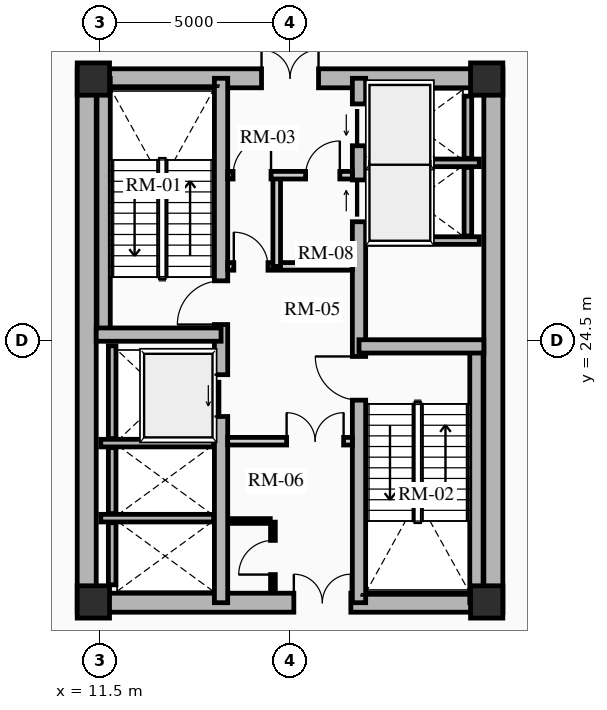
"""IFC4 building model, lengths in metres.
Left out: names, types, materials, properties, quantities, classifications, styles, units other than length and angle.
Written with IfcOpenShell. Run it as: python <this file> out.ifc"""

import sys

from ifc_helpers import new_model, si_unit, direction, frame, frame_2d, origin, origin_2d, place, context, subcontext, project, spatial, rectangle, extrude, source, transform, mapped, element, fill, save


model = new_model("IFC4")
c1 = context("Model", 3, precision=1e-05, world=origin(), true_north=direction((0.0, 1.0)))
c2 = subcontext(c1, "Body", "Model", "MODEL_VIEW")
j1 = project(units=[si_unit("LENGTHUNIT", "METRE"), si_unit("PLANEANGLEUNIT", "RADIAN")], contexts=[c1])
p1 = place(None, origin())
s1 = spatial("IfcSite", under=j1, at=p1, CompositionType="ELEMENT")
p2 = place(p1, origin())
s2 = spatial("IfcBuilding", under=s1, at=p2, CompositionType="ELEMENT")
p3 = place(p2, frame((0.0, 0.0, 9.0)))
s3 = spatial("IfcBuildingStorey", under=s2, at=p3, CompositionType="ELEMENT", Elevation=9.0)
for number, where, z_axis, x_axis in (
    (1, (11.15, 17.35, 0.0), (0.0, 0.0, 1.0), (0.0, 1.0, 0.0)),
    (2, (21.85, 17.35, 0.0), (0.0, 0.0, 1.0), (0.0, 1.0, 0.0)),
):
    element("IfcWall", number, at=place(p3, frame(where, z_axis=z_axis, x_axis=x_axis)), inside=s3, PredefinedType="SHEAR", context=c2, shape_type="SweptSolid", body=[
        extrude(rectangle(XDim=14.3, YDim=0.5, at=frame_2d((7.15, 0.0))), origin(), (0.0, 0.0, 1.0), 4.2),
    ])
p4 = place(p3, frame((11.15, 17.6, 0.0), z_axis=(0.0, 0.0, 1.0), x_axis=(1.0, 0.0, 0.0)))
e3 = element("IfcWall", 3, at=p4, inside=s3, PredefinedType="SHEAR", context=c2, shape_type="SweptSolid", body=[
    extrude(rectangle(XDim=10.7, YDim=0.5, at=frame_2d((5.35, 0.0))), origin(), (0.0, 0.0, 1.0), 4.2),
])
m1 = source(origin(), c2, "Body", "SweptSolid", [
    extrude(rectangle(XDim=1.5, YDim=2.02, at=frame_2d((0.75, 1.01))), frame((0.0, 0.26, 0.0), z_axis=(0.0, -1.0, 0.0), x_axis=(1.0, 0.0, 0.0)), (0.0, 0.0, 1.0), 0.52),
])
p5 = place(p4, frame((5.45, 0.0, 0.0)))
e4 = element("IfcOpeningElement", 4, at=p5, cuts=e3, PredefinedType="OPENING", context=c2, shape_type="MappedRepresentation", body=[
    mapped(m1, transform((0.0, 0.0, 0.0), x_axis=(1.0, 0.0, 0.0), y_axis=(0.0, 1.0, 0.0), z_axis=(0.0, 0.0, 1.0), scale=1.0)),
])
p6 = place(p3, frame((11.15, 31.4, 0.0), z_axis=(0.0, 0.0, 1.0), x_axis=(1.0, 0.0, 0.0)))
e5 = element("IfcWall", 5, at=p6, inside=s3, PredefinedType="SHEAR", context=c2, shape_type="SweptSolid", body=[
    extrude(rectangle(XDim=10.7, YDim=0.5, at=frame_2d((5.35, 0.0))), origin(), (0.0, 0.0, 1.0), 4.2),
])
p7 = place(p6, frame((4.6, 0.0, 0.0)))
e6 = element("IfcOpeningElement", 6, at=p7, cuts=e5, PredefinedType="OPENING", context=c2, shape_type="MappedRepresentation", body=[
    mapped(m1, transform((0.0, 0.0, 0.0), x_axis=(1.0, 0.0, 0.0), y_axis=(0.0, 1.0, 0.0), z_axis=(0.0, 0.0, 1.0), scale=1.0)),
])
p8 = place(p3, frame((14.685, 17.6, 0.0), z_axis=(0.0, 0.0, 1.0), x_axis=(0.0, 1.0, 0.0)))
e7 = element("IfcWall", 7, at=p8, inside=s3, PredefinedType="SHEAR", context=c2, shape_type="SweptSolid", body=[
    extrude(rectangle(XDim=13.8, YDim=0.35, at=frame_2d((6.9, 0.0))), origin(), (0.0, 0.0, 1.0), 4.2),
])
m2 = source(origin(), c2, "Body", "SweptSolid", [
    extrude(rectangle(XDim=1.1, YDim=2.015, at=frame_2d((0.55, 1.007))), frame((0.0, 0.185, 0.0), z_axis=(0.0, -1.0, 0.0), x_axis=(1.0, 0.0, 0.0)), (0.0, 0.0, 1.0), 0.37),
])
p9 = place(p8, frame((4.9, 0.0, 0.0)))
e8 = element("IfcOpeningElement", 8, at=p9, cuts=e7, PredefinedType="OPENING", context=c2, shape_type="MappedRepresentation", body=[
    mapped(m2, transform((0.0, 0.0, 0.0), x_axis=(1.0, 0.0, 0.0), y_axis=(0.0, 1.0, 0.0), z_axis=(0.0, 0.0, 1.0), scale=1.0)),
])
m3 = source(origin(), c2, "Body", "SweptSolid", [
    extrude(rectangle(XDim=1.15, YDim=2.02, at=frame_2d((0.575, 1.01))), frame((0.0, 0.185, 0.0), z_axis=(0.0, -1.0, 0.0), x_axis=(1.0, 0.0, 0.0)), (0.0, 0.0, 1.0), 0.37),
])
p10 = place(p8, frame((7.32, 0.0, 0.0)))
e9 = element("IfcOpeningElement", 9, at=p10, cuts=e7, PredefinedType="OPENING", context=c2, shape_type="MappedRepresentation", body=[
    mapped(m3, transform((0.0, 0.0, 0.0), x_axis=(1.0, 0.0, 0.0), y_axis=(0.0, 1.0, 0.0), z_axis=(0.0, 0.0, 1.0), scale=1.0)),
])
p11 = place(p3, frame((18.315, 17.6, 0.0), z_axis=(0.0, 0.0, 1.0), x_axis=(0.0, 1.0, 0.0)))
e10 = element("IfcWall", 10, at=p11, inside=s3, PredefinedType="SHEAR", context=c2, shape_type="SweptSolid", body=[
    extrude(rectangle(XDim=13.8, YDim=0.35, at=frame_2d((6.9, 0.0))), origin(), (0.0, 0.0, 1.0), 4.2),
])
p12 = place(p11, frame((10.025, 0.0, 0.0)))
e11 = element("IfcOpeningElement", 11, at=p12, cuts=e10, PredefinedType="OPENING", context=c2, shape_type="MappedRepresentation", body=[
    mapped(m2, transform((0.0, 0.0, 0.0), x_axis=(1.0, 0.0, 0.0), y_axis=(0.0, 1.0, 0.0), z_axis=(0.0, 0.0, 1.0), scale=1.0)),
])
p13 = place(p11, frame((12.025, 0.0, 0.0)))
e12 = element("IfcOpeningElement", 12, at=p13, cuts=e10, PredefinedType="OPENING", context=c2, shape_type="MappedRepresentation", body=[
    mapped(m2, transform((0.0, 0.0, 0.0), x_axis=(1.0, 0.0, 0.0), y_axis=(0.0, 1.0, 0.0), z_axis=(0.0, 0.0, 1.0), scale=1.0)),
])
p14 = place(p11, frame((5.33, 0.0, 0.0)))
e13 = element("IfcOpeningElement", 13, at=p14, cuts=e10, PredefinedType="OPENING", context=c2, shape_type="MappedRepresentation", body=[
    mapped(m3, transform((0.0, 0.0, 0.0), x_axis=(1.0, 0.0, 0.0), y_axis=(0.0, 1.0, 0.0), z_axis=(0.0, 0.0, 1.0), scale=1.0)),
])
p15 = place(p3, frame((11.595, 24.655, 0.0), z_axis=(0.0, 0.0, 1.0), x_axis=(0.0, 1.0, 0.0)))
e14 = element("IfcWall", 14, at=p15, inside=s3, PredefinedType="SHEAR", context=c2, shape_type="SweptSolid", body=[
    extrude(rectangle(XDim=6.745, YDim=0.35, at=frame_2d((3.373, 0.0))), origin(), (0.0, 0.0, 1.0), 4.2),
])
p16 = place(p3, frame((11.4, 24.655, 0.0), z_axis=(0.0, 0.0, 1.0), x_axis=(1.0, 0.0, 0.0)))
e15 = element("IfcWall", 15, at=p16, inside=s3, PredefinedType="SHEAR", context=c2, shape_type="SweptSolid", body=[
    extrude(rectangle(XDim=3.285, YDim=0.35, at=frame_2d((1.643, 0.0))), origin(), (0.0, 0.0, 1.0), 4.2),
])
p17 = place(p3, frame((21.405, 17.6, 0.0), z_axis=(0.0, 0.0, 1.0), x_axis=(0.0, 1.0, 0.0)))
e16 = element("IfcWall", 16, at=p17, inside=s3, PredefinedType="SHEAR", context=c2, shape_type="SweptSolid", body=[
    extrude(rectangle(XDim=6.745, YDim=0.35, at=frame_2d((3.373, 0.0))), origin(), (0.0, 0.0, 1.0), 4.2),
])
p18 = place(p3, frame((18.315, 24.345, 0.0), z_axis=(0.0, 0.0, 1.0), x_axis=(1.0, 0.0, 0.0)))
e17 = element("IfcWall", 17, at=p18, inside=s3, PredefinedType="SHEAR", context=c2, shape_type="SweptSolid", body=[
    extrude(rectangle(XDim=3.285, YDim=0.35, at=frame_2d((1.643, 0.0))), origin(), (0.0, 0.0, 1.0), 4.2),
])
for number, where, z_axis, x_axis in (
    (18, (11.325, 17.62, 0.0), (0.0, 0.0, 1.0), (1.0, 0.0, 0.0)),
    (19, (11.325, 31.38, 0.0), (0.0, 0.0, 1.0), (1.0, 0.0, 0.0)),
    (20, (21.675, 17.62, 0.0), (0.0, 0.0, 1.0), (1.0, 0.0, 0.0)),
    (21, (21.675, 31.38, 0.0), (0.0, 0.0, 1.0), (1.0, 0.0, 0.0)),
):
    element("IfcColumn", number, at=place(p3, frame(where, z_axis=z_axis, x_axis=x_axis)), inside=s3, PredefinedType="COLUMN", context=c2, shape_type="SweptSolid", body=[
        extrude(rectangle(XDim=0.85, YDim=0.85, at=origin_2d()), origin(), (0.0, 0.0, 1.0), 4.2),
    ])
p19 = place(p3, frame((11.52, 21.8, 0.0), z_axis=(0.0, 0.0, 1.0), x_axis=(1.0, 0.0, 0.0)))
e22 = element("IfcWall", 22, at=p19, inside=s3, PredefinedType="SHEAR", context=c2, shape_type="SweptSolid", body=[
    extrude(rectangle(XDim=2.97, YDim=0.2, at=frame_2d((1.485, 0.0))), origin(), (0.0, 0.0, 1.0), 4.2),
])
p20 = place(p3, frame((11.82, 21.92, 0.0), z_axis=(0.0, 0.0, 1.0), x_axis=(0.0, 1.0, 0.0)))
e23 = element("IfcWall", 23, at=p20, inside=s3, PredefinedType="SHEAR", context=c2, shape_type="SweptSolid", body=[
    extrude(rectangle(XDim=2.44, YDim=0.2, at=frame_2d((1.22, 0.0))), origin(), (0.0, 0.0, 1.0), 4.2),
])
p21 = place(p3, frame((11.52, 19.825, 0.0), z_axis=(0.0, 0.0, 1.0), x_axis=(1.0, 0.0, 0.0)))
e24 = element("IfcWall", 24, at=p21, inside=s3, PredefinedType="SHEAR", context=c2, shape_type="SweptSolid", body=[
    extrude(rectangle(XDim=2.97, YDim=0.2, at=frame_2d((1.485, 0.0))), origin(), (0.0, 0.0, 1.0), 4.2),
])
p22 = place(p3, frame((11.82, 19.945, 0.0), z_axis=(0.0, 0.0, 1.0), x_axis=(0.0, 1.0, 0.0)))
e25 = element("IfcWall", 25, at=p22, inside=s3, PredefinedType="SHEAR", context=c2, shape_type="SweptSolid", body=[
    extrude(rectangle(XDim=1.735, YDim=0.2, at=frame_2d((0.867, 0.0))), origin(), (0.0, 0.0, 1.0), 4.2),
])
p23 = place(p3, frame((11.82, 18.07, 0.0), z_axis=(0.0, 0.0, 1.0), x_axis=(0.0, 1.0, 0.0)))
e26 = element("IfcWall", 26, at=p23, inside=s3, PredefinedType="SHEAR", context=c2, shape_type="SweptSolid", body=[
    extrude(rectangle(XDim=1.635, YDim=0.2, at=frame_2d((0.817, 0.0))), origin(), (0.0, 0.0, 1.0), 4.2),
])
for number, where, z_axis, x_axis in (
    (27, (18.51, 27.13, 0.0), (0.0, 0.0, 1.0), (1.0, 0.0, 0.0)),
    (28, (18.51, 29.175, 0.0), (0.0, 0.0, 1.0), (1.0, 0.0, 0.0)),
):
    element("IfcWall", number, at=place(p3, frame(where, z_axis=z_axis, x_axis=x_axis)), inside=s3, PredefinedType="SHEAR", context=c2, shape_type="SweptSolid", body=[
        extrude(rectangle(XDim=2.97, YDim=0.2, at=frame_2d((1.485, 0.0))), origin(), (0.0, 0.0, 1.0), 4.2),
    ])
p24 = place(p3, frame((21.18, 27.25, 0.0), z_axis=(0.0, 0.0, 1.0), x_axis=(0.0, 1.0, 0.0)))
e29 = element("IfcWall", 29, at=p24, inside=s3, PredefinedType="SHEAR", context=c2, shape_type="SweptSolid", body=[
    extrude(rectangle(XDim=1.805, YDim=0.2, at=frame_2d((0.902, 0.0))), origin(), (0.0, 0.0, 1.0), 4.2),
])
p25 = place(p3, frame((21.18, 29.295, 0.0), z_axis=(0.0, 0.0, 1.0), x_axis=(0.0, 1.0, 0.0)))
e30 = element("IfcWall", 30, at=p25, inside=s3, PredefinedType="SHEAR", context=c2, shape_type="SweptSolid", body=[
    extrude(rectangle(XDim=1.635, YDim=0.2, at=frame_2d((0.817, 0.0))), origin(), (0.0, 0.0, 1.0), 4.2),
])
p26 = place(p3, frame((14.86, 21.85, 0.0), z_axis=(0.0, 0.0, 1.0), x_axis=(1.0, 0.0, 0.0)))
e31 = element("IfcWall", 31, at=p26, inside=s3, PredefinedType="PARTITIONING", context=c2, shape_type="SweptSolid", body=[
    extrude(rectangle(XDim=3.28, YDim=0.2, at=frame_2d((1.64, 0.0))), origin(), (0.0, 0.0, 1.0), 3.885),
])
m4 = source(origin(), c2, "Body", "SweptSolid", [
    extrude(rectangle(XDim=1.5, YDim=2.02, at=frame_2d((0.75, 1.01))), frame((0.0, 0.11, 0.0), z_axis=(0.0, -1.0, 0.0), x_axis=(1.0, 0.0, 0.0)), (0.0, 0.0, 1.0), 0.22),
])
p27 = place(p26, frame((1.55, 0.0, 0.0)))
e32 = element("IfcOpeningElement", 32, at=p27, cuts=e31, PredefinedType="OPENING", context=c2, shape_type="MappedRepresentation", body=[
    mapped(m4, transform((0.0, 0.0, 0.0), x_axis=(1.0, 0.0, 0.0), y_axis=(0.0, 1.0, 0.0), z_axis=(0.0, 0.0, 1.0), scale=1.0)),
])
p28 = place(p3, frame((14.86, 26.45, 0.0), z_axis=(0.0, 0.0, 1.0), x_axis=(1.0, 0.0, 0.0)))
e33 = element("IfcWall", 33, at=p28, inside=s3, PredefinedType="PARTITIONING", context=c2, shape_type="SweptSolid", body=[
    extrude(rectangle(XDim=3.28, YDim=0.2, at=frame_2d((1.64, 0.0))), origin(), (0.0, 0.0, 1.0), 3.885),
])
m5 = source(origin(), c2, "Body", "SweptSolid", [
    extrude(rectangle(XDim=0.9, YDim=2.005, at=frame_2d((0.45, 1.002))), frame((0.0, 0.11, 0.0), z_axis=(0.0, -1.0, 0.0), x_axis=(1.0, 0.0, 0.0)), (0.0, 0.0, 1.0), 0.22),
])
p29 = place(p28, frame((0.16, 0.0, 0.0)))
e34 = element("IfcOpeningElement", 34, at=p29, cuts=e33, PredefinedType="OPENING", context=c2, shape_type="MappedRepresentation", body=[
    mapped(m5, transform((0.0, 0.0, 0.0), x_axis=(1.0, 0.0, 0.0), y_axis=(0.0, 1.0, 0.0), z_axis=(0.0, 0.0, 1.0), scale=1.0)),
])
p30 = place(p3, frame((16.15, 26.45, 0.0), z_axis=(0.0, 0.0, 1.0), x_axis=(0.0, 1.0, 0.0)))
e35 = element("IfcWall", 35, at=p30, inside=s3, PredefinedType="PARTITIONING", context=c2, shape_type="SweptSolid", body=[
    extrude(rectangle(XDim=2.4, YDim=0.2, at=frame_2d((1.2, 0.0))), origin(), (0.0, 0.0, 1.0), 3.885),
])
p31 = place(p3, frame((14.86, 28.85, 0.0), z_axis=(0.0, 0.0, 1.0), x_axis=(1.0, 0.0, 0.0)))
e36 = element("IfcWall", 36, at=p31, inside=s3, PredefinedType="PARTITIONING", context=c2, shape_type="SweptSolid", body=[
    extrude(rectangle(XDim=3.28, YDim=0.2, at=frame_2d((1.64, 0.0))), origin(), (0.0, 0.0, 1.0), 3.885),
])
m6 = source(origin(), c2, "Body", "SweptSolid", [
    extrude(rectangle(XDim=1.0, YDim=2.015, at=frame_2d((0.5, 1.007))), frame((0.0, 0.11, 0.0), z_axis=(0.0, -1.0, 0.0), x_axis=(1.0, 0.0, 0.0)), (0.0, 0.0, 1.0), 0.22),
])
p32 = place(p31, frame((0.14, 0.0, 0.0)))
e37 = element("IfcOpeningElement", 37, at=p32, cuts=e36, PredefinedType="OPENING", context=c2, shape_type="MappedRepresentation", body=[
    mapped(m6, transform((0.0, 0.0, 0.0), x_axis=(1.0, 0.0, 0.0), y_axis=(0.0, 1.0, 0.0), z_axis=(0.0, 0.0, 1.0), scale=1.0)),
])
p33 = place(p31, frame((2.05, 0.0, 0.0)))
e38 = element("IfcOpeningElement", 38, at=p33, cuts=e36, PredefinedType="OPENING", context=c2, shape_type="MappedRepresentation", body=[
    mapped(m5, transform((0.0, 0.0, 0.0), x_axis=(1.0, 0.0, 0.0), y_axis=(0.0, 1.0, 0.0), z_axis=(0.0, 0.0, 1.0), scale=1.0)),
])
p34 = place(p3, frame((16.05, 17.92, 0.0), z_axis=(0.0, 0.0, 1.0), x_axis=(0.0, 1.0, 0.0)))
e39 = element("IfcWall", 39, at=p34, inside=s3, PredefinedType="PARTITIONING", context=c2, shape_type="SweptSolid", body=[
    extrude(rectangle(XDim=1.8, YDim=0.125, at=frame_2d((0.9, 0.0))), origin(), (0.0, 0.0, 1.0), 3.885),
])
m7 = source(origin(), c2, "Body", "SweptSolid", [
    extrude(rectangle(XDim=0.9, YDim=2.005, at=frame_2d((0.45, 1.002))), frame((0.0, 0.073, 0.0), z_axis=(0.0, -1.0, 0.0), x_axis=(1.0, 0.0, 0.0)), (0.0, 0.0, 1.0), 0.145),
])
p35 = place(p34, frame((0.42, 0.0, 0.0)))
e40 = element("IfcOpeningElement", 40, at=p35, cuts=e39, PredefinedType="OPENING", context=c2, shape_type="MappedRepresentation", body=[
    mapped(m7, transform((0.0, 0.0, 0.0), x_axis=(1.0, 0.0, 0.0), y_axis=(0.0, 1.0, 0.0), z_axis=(0.0, 0.0, 1.0), scale=1.0)),
])
p36 = place(p3, frame((14.88, 19.75, 0.0), z_axis=(0.0, 0.0, 1.0), x_axis=(1.0, 0.0, 0.0)))
e41 = element("IfcWall", 41, at=p36, inside=s3, PredefinedType="PARTITIONING", context=c2, shape_type="SweptSolid", body=[
    extrude(rectangle(XDim=1.1, YDim=0.125, at=frame_2d((0.55, 0.0))), origin(), (0.0, 0.0, 1.0), 3.885),
])
m8 = source(origin(), c2, "Body", "SweptSolid", [
    extrude(rectangle(XDim=1.1, YDim=2.015, at=frame_2d((0.55, 1.007))), frame((0.0, 0.025, 0.0), z_axis=(0.0, -1.0, 0.0), x_axis=(1.0, 0.0, 0.0)), (0.0, 0.0, 1.0), 0.05),
])
p37 = place(p9, origin())
e42 = element("IfcDoor", 42, at=p37, inside=s3, OperationType="SLIDING_TO_LEFT", PredefinedType="DOOR", context=c2, shape_type="MappedRepresentation", body=[
    mapped(m8, transform((0.0, 0.0, 0.0), x_axis=(1.0, 0.0, 0.0), y_axis=(0.0, 1.0, 0.0), z_axis=(0.0, 0.0, 1.0), scale=1.0)),
])
fill(e8, e42)
p38 = place(p12, origin())
e43 = element("IfcDoor", 43, at=p38, inside=s3, OperationType="SLIDING_TO_RIGHT", PredefinedType="DOOR", context=c2, shape_type="MappedRepresentation", body=[
    mapped(m8, transform((0.0, 0.0, 0.0), x_axis=(1.0, 0.0, 0.0), y_axis=(0.0, 1.0, 0.0), z_axis=(0.0, 0.0, 1.0), scale=1.0)),
])
fill(e11, e43)
p39 = place(p13, origin())
e44 = element("IfcDoor", 44, at=p39, inside=s3, OperationType="SLIDING_TO_LEFT", PredefinedType="DOOR", context=c2, shape_type="MappedRepresentation", body=[
    mapped(m8, transform((0.0, 0.0, 0.0), x_axis=(1.0, 0.0, 0.0), y_axis=(0.0, 1.0, 0.0), z_axis=(0.0, 0.0, 1.0), scale=1.0)),
])
fill(e12, e44)
m9 = source(origin(), c2, "Body", "SweptSolid", [
    extrude(rectangle(XDim=1.15, YDim=2.02, at=frame_2d((0.575, 1.01))), frame((0.0, 0.025, 0.0), z_axis=(0.0, -1.0, 0.0), x_axis=(1.0, 0.0, 0.0)), (0.0, 0.0, 1.0), 0.05),
])
p40 = place(p10, origin())
e45 = element("IfcDoor", 45, at=p40, inside=s3, OperationType="SINGLE_SWING_LEFT", PredefinedType="DOOR", context=c2, shape_type="MappedRepresentation", body=[
    mapped(m9, transform((0.0, 0.0, 0.0), x_axis=(1.0, 0.0, 0.0), y_axis=(0.0, 1.0, 0.0), z_axis=(0.0, 0.0, 1.0), scale=1.0)),
])
fill(e9, e45)
p41 = place(p14, origin())
e46 = element("IfcDoor", 46, at=p41, inside=s3, OperationType="SINGLE_SWING_RIGHT", PredefinedType="DOOR", context=c2, shape_type="MappedRepresentation", body=[
    mapped(m9, transform((0.0, 0.0, 0.0), x_axis=(1.0, 0.0, 0.0), y_axis=(0.0, 1.0, 0.0), z_axis=(0.0, 0.0, 1.0), scale=1.0)),
])
fill(e13, e46)
m10 = source(origin(), c2, "Body", "SweptSolid", [
    extrude(rectangle(XDim=1.5, YDim=2.02, at=frame_2d((0.75, 1.01))), frame((0.0, 0.025, 0.0), z_axis=(0.0, -1.0, 0.0), x_axis=(1.0, 0.0, 0.0)), (0.0, 0.0, 1.0), 0.05),
])
p42 = place(p7, origin())
e47 = element("IfcDoor", 47, at=p42, inside=s3, OperationType="DOUBLE_DOOR_SINGLE_SWING", PredefinedType="DOOR", context=c2, shape_type="MappedRepresentation", body=[
    mapped(m10, transform((0.0, 0.0, 0.0), x_axis=(1.0, 0.0, 0.0), y_axis=(0.0, 1.0, 0.0), z_axis=(0.0, 0.0, 1.0), scale=1.0)),
])
fill(e6, e47)
p43 = place(p5, origin())
e48 = element("IfcDoor", 48, at=p43, inside=s3, OperationType="DOUBLE_DOOR_SINGLE_SWING", PredefinedType="DOOR", context=c2, shape_type="MappedRepresentation", body=[
    mapped(m10, transform((0.0, 0.0, 0.0), x_axis=(1.0, 0.0, 0.0), y_axis=(0.0, 1.0, 0.0), z_axis=(0.0, 0.0, 1.0), scale=1.0)),
])
fill(e4, e48)
p44 = place(p27, origin())
e49 = element("IfcDoor", 49, at=p44, inside=s3, OperationType="DOUBLE_DOOR_SINGLE_SWING", PredefinedType="DOOR", context=c2, shape_type="MappedRepresentation", body=[
    mapped(m10, transform((0.0, 0.0, 0.0), x_axis=(1.0, 0.0, 0.0), y_axis=(0.0, 1.0, 0.0), z_axis=(0.0, 0.0, 1.0), scale=1.0)),
])
fill(e32, e49)
m11 = source(origin(), c2, "Body", "SweptSolid", [
    extrude(rectangle(XDim=0.9, YDim=2.005, at=frame_2d((0.45, 1.002))), frame((0.0, 0.025, 0.0), z_axis=(0.0, -1.0, 0.0), x_axis=(1.0, 0.0, 0.0)), (0.0, 0.0, 1.0), 0.05),
])
p45 = place(p29, origin())
e50 = element("IfcDoor", 50, at=p45, inside=s3, OperationType="SINGLE_SWING_LEFT", PredefinedType="DOOR", context=c2, shape_type="MappedRepresentation", body=[
    mapped(m11, transform((0.0, 0.0, 0.0), x_axis=(1.0, 0.0, 0.0), y_axis=(0.0, 1.0, 0.0), z_axis=(0.0, 0.0, 1.0), scale=1.0)),
])
fill(e34, e50)
m12 = source(origin(), c2, "Body", "SweptSolid", [
    extrude(rectangle(XDim=1.0, YDim=2.015, at=frame_2d((0.5, 1.007))), frame((0.0, 0.025, 0.0), z_axis=(0.0, -1.0, 0.0), x_axis=(1.0, 0.0, 0.0)), (0.0, 0.0, 1.0), 0.05),
])
p46 = place(p32, origin())
e51 = element("IfcDoor", 51, at=p46, inside=s3, OperationType="SINGLE_SWING_RIGHT", PredefinedType="DOOR", context=c2, shape_type="MappedRepresentation", body=[
    mapped(m12, transform((0.0, 0.0, 0.0), x_axis=(1.0, 0.0, 0.0), y_axis=(0.0, 1.0, 0.0), z_axis=(0.0, 0.0, 1.0), scale=1.0)),
])
fill(e37, e51)
p47 = place(p35, origin())
e52 = element("IfcDoor", 52, at=p47, inside=s3, OperationType="SINGLE_SWING_LEFT", PredefinedType="DOOR", context=c2, shape_type="MappedRepresentation", body=[
    mapped(m11, transform((0.0, 0.0, 0.0), x_axis=(1.0, 0.0, 0.0), y_axis=(0.0, 1.0, 0.0), z_axis=(0.0, 0.0, 1.0), scale=1.0)),
])
fill(e40, e52)
p48 = place(p33, origin())
e53 = element("IfcDoor", 53, at=p48, inside=s3, OperationType="SINGLE_SWING_RIGHT", PredefinedType="DOOR", context=c2, shape_type="MappedRepresentation", body=[
    mapped(m11, transform((0.0, 0.0, 0.0), x_axis=(1.0, 0.0, 0.0), y_axis=(0.0, 1.0, 0.0), z_axis=(0.0, 0.0, 1.0), scale=1.0)),
])
fill(e38, e53)
save(model, sys.argv[1])
